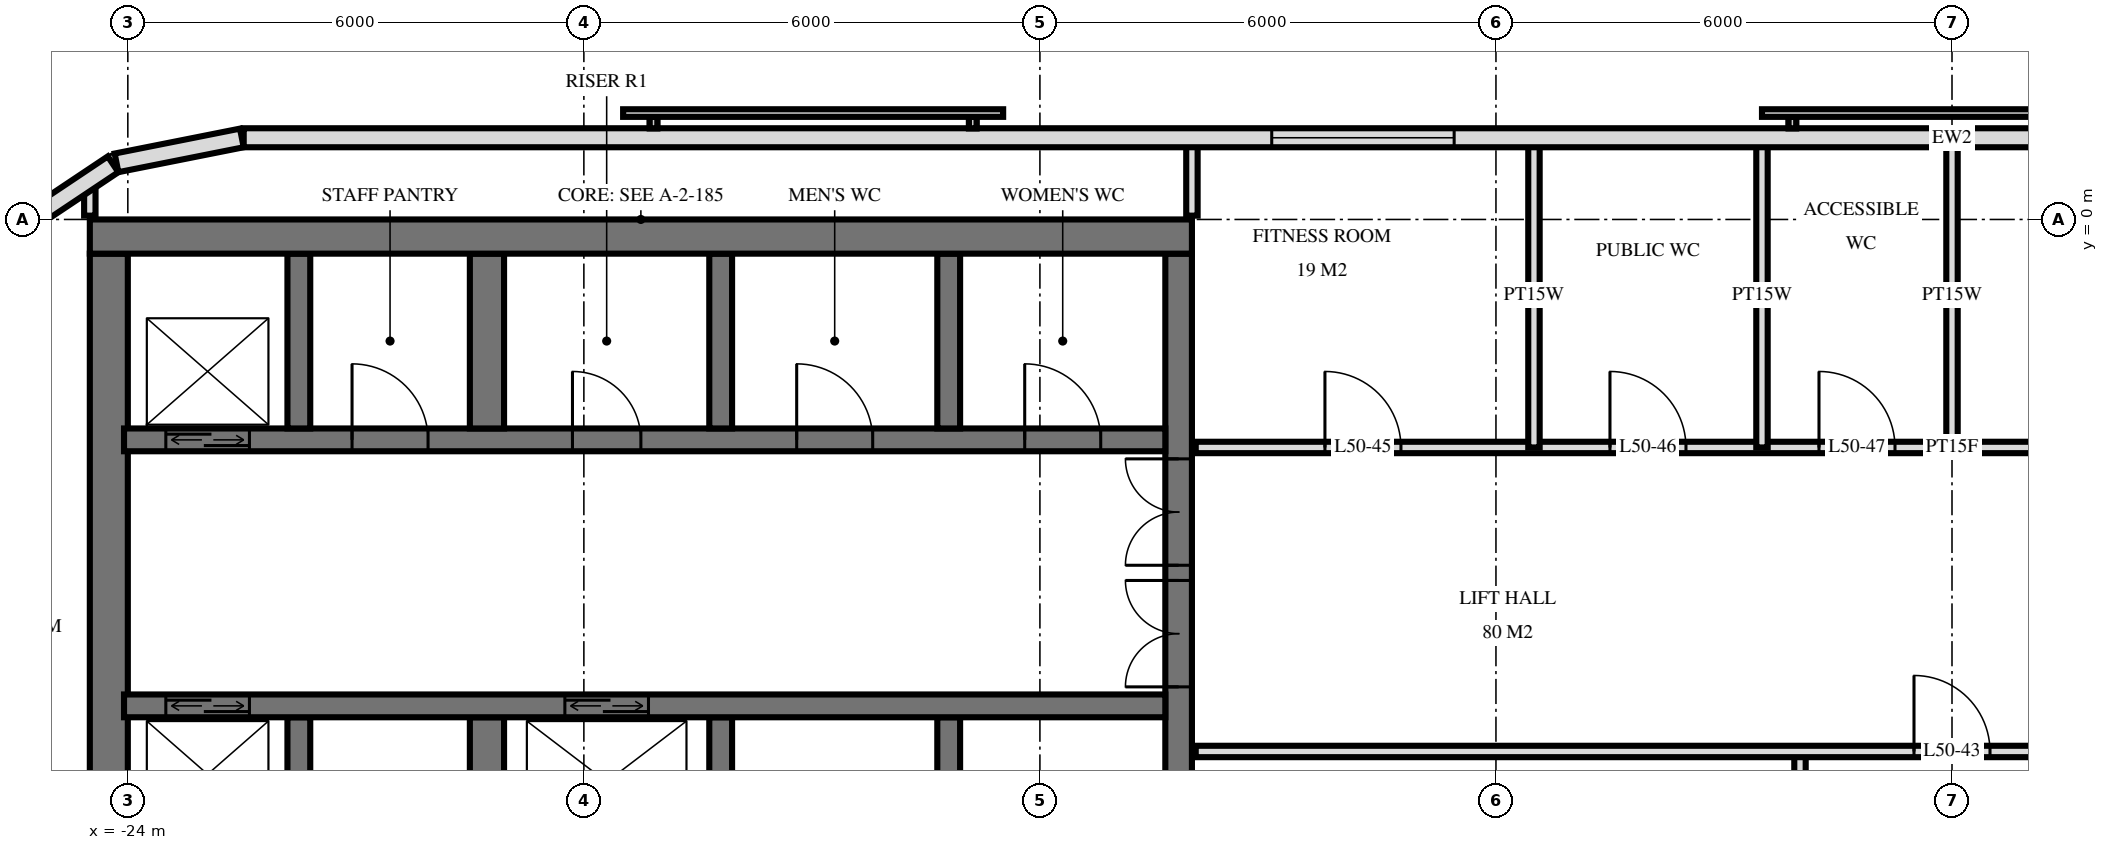
"""IFC4 building model, lengths in metres.
Left out: names, types, materials, properties, quantities, classifications, styles, units other than length and angle.
Written with IfcOpenShell. Run it as: python <this file> out.ifc"""

import sys

from ifc_helpers import new_model, si_unit, direction, frame, frame_2d, origin, place, context, subcontext, project, spatial, rectangle, extrude, element, fill, save


model = new_model("IFC4")
c1 = context("Model", 3, precision=1e-05, world=origin(), true_north=direction((0.0, 1.0)))
c2 = subcontext(c1, "Body", "Model", "MODEL_VIEW")
j1 = project(units=[si_unit("LENGTHUNIT", "METRE"), si_unit("PLANEANGLEUNIT", "RADIAN")], contexts=[c1])
p1 = place(None, origin())
s1 = spatial("IfcSite", under=j1, at=p1, CompositionType="ELEMENT")
p2 = place(p1, origin())
s2 = spatial("IfcBuilding", under=s1, at=p2, CompositionType="ELEMENT")
p3 = place(p2, frame((0.0, 0.0, 194.1)))
s3 = spatial("IfcBuildingStorey", under=s2, at=p3, CompositionType="ELEMENT", Elevation=194.1)
p4 = place(p3, frame((-24.5, -0.225, 0.0), z_axis=(0.0, 0.0, 1.0), x_axis=(1.0, 0.0, 0.0)))
e1 = element("IfcWall", 1, at=p4, inside=s3, PredefinedType="SHEAR", context=c2, shape_type="SweptSolid", body=[
    extrude(rectangle(XDim=14.5, YDim=0.45, at=frame_2d((7.25, 0.0))), origin(), (0.0, 0.0, 1.0), 3.5),
])
p5 = place(p3, frame((-10.175, -14.55, 0.0), z_axis=(0.0, 0.0, 1.0), x_axis=(0.0, 1.0, 0.0)))
e2 = element("IfcWall", 2, at=p5, inside=s3, PredefinedType="SHEAR", context=c2, shape_type="SweptSolid", body=[
    extrude(rectangle(XDim=14.1, YDim=0.35, at=frame_2d((7.05, 0.0))), origin(), (0.0, 0.0, 1.0), 3.5),
])
p6 = place(p5, frame((8.4, 0.0, 0.0)))
e3 = element("IfcOpeningElement", 3, at=p6, cuts=e2, PredefinedType="OPENING", context=c2, shape_type="SweptSolid", body=[
    extrude(rectangle(XDim=1.4, YDim=2.4, at=frame_2d((0.7, 1.2))), frame((0.0, 0.185, 0.0), z_axis=(0.0, -1.0, 0.0), x_axis=(1.0, 0.0, 0.0)), (0.0, 0.0, 1.0), 0.37),
])
p7 = place(p5, frame((10.0, 0.0, 0.0)))
e4 = element("IfcOpeningElement", 4, at=p7, cuts=e2, PredefinedType="OPENING", context=c2, shape_type="SweptSolid", body=[
    extrude(rectangle(XDim=1.4, YDim=2.4, at=frame_2d((0.7, 1.2))), frame((0.0, 0.185, 0.0), z_axis=(0.0, -1.0, 0.0), x_axis=(1.0, 0.0, 0.0)), (0.0, 0.0, 1.0), 0.37),
])
p8 = place(p5, frame((4.0, 0.0, 0.0)))
e5 = element("IfcOpeningElement", 5, at=p8, cuts=e2, PredefinedType="OPENING", context=c2, shape_type="SweptSolid", body=[
    extrude(rectangle(XDim=1.2, YDim=2.1, at=frame_2d((0.6, 1.05))), frame((0.0, 0.185, 0.0), z_axis=(0.0, -1.0, 0.0), x_axis=(1.0, 0.0, 0.0)), (0.0, 0.0, 1.0), 0.37),
])
p9 = place(p3, frame((-24.25, -14.55, 0.0), z_axis=(0.0, 0.0, 1.0), x_axis=(0.0, 1.0, 0.0)))
e6 = element("IfcWall", 6, at=p9, inside=s3, PredefinedType="SHEAR", context=c2, shape_type="SweptSolid", body=[
    extrude(rectangle(XDim=14.1, YDim=0.5, at=frame_2d((7.05, 0.0))), origin(), (0.0, 0.0, 1.0), 3.5),
])
p10 = place(p3, frame((-24.05, -2.9, 0.0), z_axis=(0.0, 0.0, 1.0), x_axis=(1.0, 0.0, 0.0)))
e7 = element("IfcWall", 7, at=p10, inside=s3, PredefinedType="SHEAR", context=c2, shape_type="SweptSolid", body=[
    extrude(rectangle(XDim=13.7, YDim=0.3, at=frame_2d((6.85, 0.0))), origin(), (0.0, 0.0, 1.0), 3.5),
])
p11 = place(p10, frame((0.55, 0.0, 0.0)))
e8 = element("IfcOpeningElement", 8, at=p11, cuts=e7, PredefinedType="OPENING", context=c2, shape_type="SweptSolid", body=[
    extrude(rectangle(XDim=1.1, YDim=2.1, at=frame_2d((0.55, 1.05))), frame((0.0, 0.16, 0.0), z_axis=(0.0, -1.0, 0.0), x_axis=(1.0, 0.0, 0.0)), (0.0, 0.0, 1.0), 0.32),
])
p12 = place(p10, frame((5.9, 0.0, 0.0)))
e9 = element("IfcOpeningElement", 9, at=p12, cuts=e7, PredefinedType="OPENING", context=c2, shape_type="SweptSolid", body=[
    extrude(rectangle(XDim=0.9, YDim=2.1, at=frame_2d((0.45, 1.05))), frame((0.0, 0.16, 0.0), z_axis=(0.0, -1.0, 0.0), x_axis=(1.0, 0.0, 0.0)), (0.0, 0.0, 1.0), 0.32),
])
p13 = place(p10, frame((11.85, 0.0, 0.0)))
e10 = element("IfcOpeningElement", 10, at=p13, cuts=e7, PredefinedType="OPENING", context=c2, shape_type="SweptSolid", body=[
    extrude(rectangle(XDim=1.0, YDim=2.1, at=frame_2d((0.5, 1.05))), frame((0.0, 0.16, 0.0), z_axis=(0.0, -1.0, 0.0), x_axis=(1.0, 0.0, 0.0)), (0.0, 0.0, 1.0), 0.32),
])
p14 = place(p10, frame((8.85, 0.0, 0.0)))
e11 = element("IfcOpeningElement", 11, at=p14, cuts=e7, PredefinedType="OPENING", context=c2, shape_type="SweptSolid", body=[
    extrude(rectangle(XDim=1.0, YDim=2.1, at=frame_2d((0.5, 1.05))), frame((0.0, 0.16, 0.0), z_axis=(0.0, -1.0, 0.0), x_axis=(1.0, 0.0, 0.0)), (0.0, 0.0, 1.0), 0.32),
])
p15 = place(p10, frame((3.0, 0.0, 0.0)))
e12 = element("IfcOpeningElement", 12, at=p15, cuts=e7, PredefinedType="OPENING", context=c2, shape_type="SweptSolid", body=[
    extrude(rectangle(XDim=1.0, YDim=2.1, at=frame_2d((0.5, 1.05))), frame((0.0, 0.16, 0.0), z_axis=(0.0, -1.0, 0.0), x_axis=(1.0, 0.0, 0.0)), (0.0, 0.0, 1.0), 0.32),
])
p16 = place(p3, frame((-24.05, -6.4, 0.0), z_axis=(0.0, 0.0, 1.0), x_axis=(1.0, 0.0, 0.0)))
e13 = element("IfcWall", 13, at=p16, inside=s3, PredefinedType="SHEAR", context=c2, shape_type="SweptSolid", body=[
    extrude(rectangle(XDim=13.7, YDim=0.3, at=frame_2d((6.85, 0.0))), origin(), (0.0, 0.0, 1.0), 3.5),
])
p17 = place(p16, frame((0.55, 0.0, 0.0)))
e14 = element("IfcOpeningElement", 14, at=p17, cuts=e13, PredefinedType="OPENING", context=c2, shape_type="SweptSolid", body=[
    extrude(rectangle(XDim=1.1, YDim=2.1, at=frame_2d((0.55, 1.05))), frame((0.0, 0.16, 0.0), z_axis=(0.0, -1.0, 0.0), x_axis=(1.0, 0.0, 0.0)), (0.0, 0.0, 1.0), 0.32),
])
p18 = place(p16, frame((5.8, 0.0, 0.0)))
e15 = element("IfcOpeningElement", 15, at=p18, cuts=e13, PredefinedType="OPENING", context=c2, shape_type="SweptSolid", body=[
    extrude(rectangle(XDim=1.1, YDim=2.1, at=frame_2d((0.55, 1.05))), frame((0.0, 0.16, 0.0), z_axis=(0.0, -1.0, 0.0), x_axis=(1.0, 0.0, 0.0)), (0.0, 0.0, 1.0), 0.32),
])
for number, where, z_axis, x_axis in (
    (16, (-13.2, -2.75, 0.0), (0.0, 0.0, 1.0), (0.0, 1.0, 0.0)),
    (17, (-13.2, -8.85, 0.0), (0.0, 0.0, 1.0), (0.0, 1.0, 0.0)),
    (18, (-16.2, -2.75, 0.0), (0.0, 0.0, 1.0), (0.0, 1.0, 0.0)),
    (19, (-16.2, -8.85, 0.0), (0.0, 0.0, 1.0), (0.0, 1.0, 0.0)),
):
    element("IfcWall", number, at=place(p3, frame(where, z_axis=z_axis, x_axis=x_axis)), inside=s3, PredefinedType="SHEAR", context=c2, shape_type="SweptSolid", body=[
        extrude(rectangle(XDim=2.3, YDim=0.3, at=frame_2d((1.15, 0.0))), origin(), (0.0, 0.0, 1.0), 3.5),
    ])
for number, where, z_axis, x_axis in (
    (20, (-19.275, -2.75, 0.0), (0.0, 0.0, 1.0), (0.0, 1.0, 0.0)),
    (21, (-19.275, -8.85, 0.0), (0.0, 0.0, 1.0), (0.0, 1.0, 0.0)),
):
    element("IfcWall", number, at=place(p3, frame(where, z_axis=z_axis, x_axis=x_axis)), inside=s3, PredefinedType="SHEAR", context=c2, shape_type="SweptSolid", body=[
        extrude(rectangle(XDim=2.3, YDim=0.45, at=frame_2d((1.15, 0.0))), origin(), (0.0, 0.0, 1.0), 3.5),
    ])
for number, where, z_axis, x_axis in (
    (22, (-21.75, -2.75, 0.0), (0.0, 0.0, 1.0), (0.0, 1.0, 0.0)),
    (23, (-21.75, -8.85, 0.0), (0.0, 0.0, 1.0), (0.0, 1.0, 0.0)),
):
    element("IfcWall", number, at=place(p3, frame(where, z_axis=z_axis, x_axis=x_axis)), inside=s3, PredefinedType="SHEAR", context=c2, shape_type="SweptSolid", body=[
        extrude(rectangle(XDim=2.3, YDim=0.3, at=frame_2d((1.15, 0.0))), origin(), (0.0, 0.0, 1.0), 3.5),
    ])
p19 = place(p3, frame((22.475, 1.075, 0.0), z_axis=(0.0, 0.0, 1.0), x_axis=(-1.0, 0.0, 0.0)))
e24 = element("IfcWall", 24, at=p19, inside=s3, PredefinedType="SOLIDWALL", context=c2, shape_type="SweptSolid", body=[
    extrude(rectangle(XDim=44.951, YDim=0.25, at=frame_2d((22.475, 0.0))), origin(), (0.0, 0.0, 1.0), 3.22),
])
p20 = place(p19, frame((13.775, 0.0, 0.9)))
e25 = element("IfcOpeningElement", 25, at=p20, cuts=e24, PredefinedType="OPENING", context=c2, shape_type="SweptSolid", body=[
    extrude(rectangle(XDim=2.4, YDim=1.5, at=frame_2d((1.2, 0.75))), frame((0.0, 0.135, 0.0), z_axis=(0.0, -1.0, 0.0), x_axis=(1.0, 0.0, 0.0)), (0.0, 0.0, 1.0), 0.27),
])
p21 = place(p19, frame((18.275, 0.0, 0.9)))
e26 = element("IfcOpeningElement", 26, at=p21, cuts=e24, PredefinedType="OPENING", context=c2, shape_type="SweptSolid", body=[
    extrude(rectangle(XDim=2.4, YDim=1.5, at=frame_2d((1.2, 0.75))), frame((0.0, 0.135, 0.0), z_axis=(0.0, -1.0, 0.0), x_axis=(1.0, 0.0, 0.0)), (0.0, 0.0, 1.0), 0.27),
])
p22 = place(p19, frame((29.025, 0.0, 0.9)))
e27 = element("IfcOpeningElement", 27, at=p22, cuts=e24, PredefinedType="OPENING", context=c2, shape_type="SweptSolid", body=[
    extrude(rectangle(XDim=2.4, YDim=1.5, at=frame_2d((1.2, 0.75))), frame((0.0, 0.135, 0.0), z_axis=(0.0, -1.0, 0.0), x_axis=(1.0, 0.0, 0.0)), (0.0, 0.0, 1.0), 0.27),
])
p23 = place(p3, frame((-22.5, 1.073, 0.0), z_axis=(0.0, 0.0, 1.0), x_axis=(-0.980803419081, -0.194999110559, 0.0)))
e28 = element("IfcWall", 28, at=p23, inside=s3, PredefinedType="SOLIDWALL", context=c2, shape_type="SweptSolid", body=[
    extrude(rectangle(XDim=1.681, YDim=0.25, at=frame_2d((0.841, 0.0))), origin(), (0.0, 0.0, 1.0), 3.22),
])
p24 = place(p3, frame((-24.194, 0.726, 0.0), z_axis=(0.0, 0.0, 1.0), x_axis=(-0.831482937015, -0.55555029066, 0.0)))
e29 = element("IfcWall", 29, at=p24, inside=s3, PredefinedType="SOLIDWALL", context=c2, shape_type="SweptSolid", body=[
    extrude(rectangle(XDim=1.656, YDim=0.25, at=frame_2d((0.828, 0.0))), origin(), (0.0, 0.0, 1.0), 3.22),
])
p25 = place(p3, frame((0.0, -3.0, 0.0), z_axis=(0.0, 0.0, 1.0), x_axis=(0.0, 1.0, 0.0)))
e30 = element("IfcWall", 30, at=p25, inside=s3, PredefinedType="PLUMBINGWALL", context=c2, shape_type="SweptSolid", body=[
    extrude(rectangle(XDim=4.02, YDim=0.15, at=frame_2d((2.01, 0.0))), origin(), (0.0, 0.0, 1.0), 3.22),
])
p26 = place(p3, frame((-2.0, -11.0, 0.0), z_axis=(0.0, 0.0, 1.0), x_axis=(0.0, 1.0, 0.0)))
e31 = element("IfcWall", 31, at=p26, inside=s3, PredefinedType="PARTITIONING", context=c2, shape_type="SweptSolid", body=[
    extrude(rectangle(XDim=4.0, YDim=0.15, at=frame_2d((2.0, 0.0))), origin(), (0.0, 0.0, 1.0), 3.22),
])
for number, where, z_axis, x_axis in (
    (32, (-2.5, -3.0, 0.0), (0.0, 0.0, 1.0), (0.0, 1.0, 0.0)),
    (33, (-5.5, -3.0, 0.0), (0.0, 0.0, 1.0), (0.0, 1.0, 0.0)),
):
    element("IfcWall", number, at=place(p3, frame(where, z_axis=z_axis, x_axis=x_axis)), inside=s3, PredefinedType="PLUMBINGWALL", context=c2, shape_type="SweptSolid", body=[
        extrude(rectangle(XDim=4.02, YDim=0.15, at=frame_2d((2.01, 0.0))), origin(), (0.0, 0.0, 1.0), 3.22),
    ])
p27 = place(p3, frame((-10.0, 0.05, 0.0), z_axis=(0.0, 0.0, 1.0), x_axis=(0.0, 1.0, 0.0)))
e34 = element("IfcWall", 34, at=p27, inside=s3, PredefinedType="PARTITIONING", context=c2, shape_type="SweptSolid", body=[
    extrude(rectangle(XDim=0.97, YDim=0.15, at=frame_2d((0.485, 0.0))), origin(), (0.0, 0.0, 1.0), 3.22),
])
p28 = place(p3, frame((-24.5, 0.05, 0.0), z_axis=(0.0, 0.0, 1.0), x_axis=(0.0, 1.0, 0.0)))
e35 = element("IfcWall", 35, at=p28, inside=s3, PredefinedType="PARTITIONING", context=c2, shape_type="SweptSolid", body=[
    extrude(rectangle(XDim=0.405, YDim=0.15, at=frame_2d((0.203, 0.0))), origin(), (0.0, 0.0, 1.0), 3.22),
])
p29 = place(p3, frame((-9.95, -7.0, 0.0), z_axis=(0.0, 0.0, 1.0), x_axis=(1.0, 0.0, 0.0)))
e36 = element("IfcWall", 36, at=p29, inside=s3, PredefinedType="PARTITIONING", context=c2, shape_type="SweptSolid", body=[
    extrude(rectangle(XDim=19.9, YDim=0.15, at=frame_2d((9.95, 0.0))), origin(), (0.0, 0.0, 1.0), 3.22),
])
p30 = place(p29, frame((9.45, 0.0, 0.0)))
e37 = element("IfcOpeningElement", 37, at=p30, cuts=e36, PredefinedType="OPENING", context=c2, shape_type="SweptSolid", body=[
    extrude(rectangle(XDim=1.0, YDim=2.1, at=frame_2d((0.5, 1.05))), frame((0.0, 0.085, 0.0), z_axis=(0.0, -1.0, 0.0), x_axis=(1.0, 0.0, 0.0)), (0.0, 0.0, 1.0), 0.17),
])
p31 = place(p29, frame((15.45, 0.0, 0.0)))
e38 = element("IfcOpeningElement", 38, at=p31, cuts=e36, PredefinedType="OPENING", context=c2, shape_type="SweptSolid", body=[
    extrude(rectangle(XDim=1.0, YDim=2.1, at=frame_2d((0.5, 1.05))), frame((0.0, 0.085, 0.0), z_axis=(0.0, -1.0, 0.0), x_axis=(1.0, 0.0, 0.0)), (0.0, 0.0, 1.0), 0.17),
])
p32 = place(p3, frame((-9.95, -3.0, 0.0), z_axis=(0.0, 0.0, 1.0), x_axis=(1.0, 0.0, 0.0)))
e39 = element("IfcWall", 39, at=p32, inside=s3, PredefinedType="PARTITIONING", context=c2, shape_type="SweptSolid", body=[
    extrude(rectangle(XDim=19.9, YDim=0.15, at=frame_2d((9.95, 0.0))), origin(), (0.0, 0.0, 1.0), 3.22),
])
p33 = place(p32, frame((1.7, 0.0, 0.0)))
e40 = element("IfcOpeningElement", 40, at=p33, cuts=e39, PredefinedType="OPENING", context=c2, shape_type="SweptSolid", body=[
    extrude(rectangle(XDim=1.0, YDim=2.1, at=frame_2d((0.5, 1.05))), frame((0.0, 0.085, 0.0), z_axis=(0.0, -1.0, 0.0), x_axis=(1.0, 0.0, 0.0)), (0.0, 0.0, 1.0), 0.17),
])
p34 = place(p32, frame((5.45, 0.0, 0.0)))
e41 = element("IfcOpeningElement", 41, at=p34, cuts=e39, PredefinedType="OPENING", context=c2, shape_type="SweptSolid", body=[
    extrude(rectangle(XDim=1.0, YDim=2.1, at=frame_2d((0.5, 1.05))), frame((0.0, 0.085, 0.0), z_axis=(0.0, -1.0, 0.0), x_axis=(1.0, 0.0, 0.0)), (0.0, 0.0, 1.0), 0.17),
])
p35 = place(p32, frame((8.2, 0.0, 0.0)))
e42 = element("IfcOpeningElement", 42, at=p35, cuts=e39, PredefinedType="OPENING", context=c2, shape_type="SweptSolid", body=[
    extrude(rectangle(XDim=1.0, YDim=2.1, at=frame_2d((0.5, 1.05))), frame((0.0, 0.085, 0.0), z_axis=(0.0, -1.0, 0.0), x_axis=(1.0, 0.0, 0.0)), (0.0, 0.0, 1.0), 0.17),
])
p36 = place(p32, frame((11.95, 0.0, 0.0)))
e43 = element("IfcOpeningElement", 43, at=p36, cuts=e39, PredefinedType="OPENING", context=c2, shape_type="SweptSolid", body=[
    extrude(rectangle(XDim=1.0, YDim=2.1, at=frame_2d((0.5, 1.05))), frame((0.0, 0.085, 0.0), z_axis=(0.0, -1.0, 0.0), x_axis=(1.0, 0.0, 0.0)), (0.0, 0.0, 1.0), 0.17),
])
p37 = place(p32, frame((16.95, 0.0, 0.0)))
e44 = element("IfcOpeningElement", 44, at=p37, cuts=e39, PredefinedType="OPENING", context=c2, shape_type="SweptSolid", body=[
    extrude(rectangle(XDim=1.0, YDim=2.1, at=frame_2d((0.5, 1.05))), frame((0.0, 0.085, 0.0), z_axis=(0.0, -1.0, 0.0), x_axis=(1.0, 0.0, 0.0)), (0.0, 0.0, 1.0), 0.17),
])
p38 = place(p22, origin())
e45 = element("IfcWindow", 45, at=p38, inside=s3, PartitioningType="SINGLE_PANEL", PredefinedType="WINDOW", context=c2, shape_type="SweptSolid", body=[
    extrude(rectangle(XDim=2.4, YDim=1.5, at=frame_2d((1.2, 0.75))), frame((0.0, 0.03, 0.0), z_axis=(0.0, -1.0, 0.0), x_axis=(1.0, 0.0, 0.0)), (0.0, 0.0, 1.0), 0.06),
])
fill(e27, e45)
p39 = place(p11, origin())
e46 = element("IfcDoor", 46, at=p39, inside=s3, OperationType="DOUBLE_DOOR_SLIDING", PredefinedType="USERDEFINED", context=c2, shape_type="SweptSolid", body=[
    extrude(rectangle(XDim=1.1, YDim=2.1, at=frame_2d((0.55, 1.05))), frame((0.0, 0.025, 0.0), z_axis=(0.0, -1.0, 0.0), x_axis=(1.0, 0.0, 0.0)), (0.0, 0.0, 1.0), 0.05),
])
fill(e8, e46)
p40 = place(p17, origin())
e47 = element("IfcDoor", 47, at=p40, inside=s3, OperationType="DOUBLE_DOOR_SLIDING", PredefinedType="USERDEFINED", context=c2, shape_type="SweptSolid", body=[
    extrude(rectangle(XDim=1.1, YDim=2.1, at=frame_2d((0.55, 1.05))), frame((0.0, 0.025, 0.0), z_axis=(0.0, -1.0, 0.0), x_axis=(1.0, 0.0, 0.0)), (0.0, 0.0, 1.0), 0.05),
])
fill(e14, e47)
p41 = place(p18, origin())
e48 = element("IfcDoor", 48, at=p41, inside=s3, OperationType="DOUBLE_DOOR_SLIDING", PredefinedType="USERDEFINED", context=c2, shape_type="SweptSolid", body=[
    extrude(rectangle(XDim=1.1, YDim=2.1, at=frame_2d((0.55, 1.05))), frame((0.0, 0.025, 0.0), z_axis=(0.0, -1.0, 0.0), x_axis=(1.0, 0.0, 0.0)), (0.0, 0.0, 1.0), 0.05),
])
fill(e15, e48)
p42 = place(p6, origin())
e49 = element("IfcDoor", 49, at=p42, inside=s3, OperationType="DOUBLE_DOOR_SINGLE_SWING", PredefinedType="DOOR", context=c2, shape_type="SweptSolid", body=[
    extrude(rectangle(XDim=1.4, YDim=2.4, at=frame_2d((0.7, 1.2))), frame((0.0, 0.025, 0.0), z_axis=(0.0, -1.0, 0.0), x_axis=(1.0, 0.0, 0.0)), (0.0, 0.0, 1.0), 0.05),
])
fill(e3, e49)
p43 = place(p7, origin())
e50 = element("IfcDoor", 50, at=p43, inside=s3, OperationType="DOUBLE_DOOR_SINGLE_SWING", PredefinedType="DOOR", context=c2, shape_type="SweptSolid", body=[
    extrude(rectangle(XDim=1.4, YDim=2.4, at=frame_2d((0.7, 1.2))), frame((0.0, 0.025, 0.0), z_axis=(0.0, -1.0, 0.0), x_axis=(1.0, 0.0, 0.0)), (0.0, 0.0, 1.0), 0.05),
])
fill(e4, e50)
p44 = place(p12, origin())
e51 = element("IfcDoor", 51, at=p44, inside=s3, OperationType="SINGLE_SWING_RIGHT", PredefinedType="DOOR", context=c2, shape_type="SweptSolid", body=[
    extrude(rectangle(XDim=0.9, YDim=2.1, at=frame_2d((0.45, 1.05))), frame((0.0, 0.025, 0.0), z_axis=(0.0, -1.0, 0.0), x_axis=(1.0, 0.0, 0.0)), (0.0, 0.0, 1.0), 0.05),
])
fill(e9, e51)
p45 = place(p13, origin())
e52 = element("IfcDoor", 52, at=p45, inside=s3, OperationType="SINGLE_SWING_RIGHT", PredefinedType="DOOR", context=c2, shape_type="SweptSolid", body=[
    extrude(rectangle(XDim=1.0, YDim=2.1, at=frame_2d((0.5, 1.05))), frame((0.0, 0.025, 0.0), z_axis=(0.0, -1.0, 0.0), x_axis=(1.0, 0.0, 0.0)), (0.0, 0.0, 1.0), 0.05),
])
fill(e10, e52)
p46 = place(p14, origin())
e53 = element("IfcDoor", 53, at=p46, inside=s3, OperationType="SINGLE_SWING_RIGHT", PredefinedType="DOOR", context=c2, shape_type="SweptSolid", body=[
    extrude(rectangle(XDim=1.0, YDim=2.1, at=frame_2d((0.5, 1.05))), frame((0.0, 0.025, 0.0), z_axis=(0.0, -1.0, 0.0), x_axis=(1.0, 0.0, 0.0)), (0.0, 0.0, 1.0), 0.05),
])
fill(e11, e53)
p47 = place(p15, origin())
e54 = element("IfcDoor", 54, at=p47, inside=s3, OperationType="SINGLE_SWING_RIGHT", PredefinedType="DOOR", context=c2, shape_type="SweptSolid", body=[
    extrude(rectangle(XDim=1.0, YDim=2.1, at=frame_2d((0.5, 1.05))), frame((0.0, 0.025, 0.0), z_axis=(0.0, -1.0, 0.0), x_axis=(1.0, 0.0, 0.0)), (0.0, 0.0, 1.0), 0.05),
])
fill(e12, e54)
p48 = place(p30, origin())
e55 = element("IfcDoor", 55, at=p48, inside=s3, OperationType="SINGLE_SWING_RIGHT", PredefinedType="DOOR", context=c2, shape_type="SweptSolid", body=[
    extrude(rectangle(XDim=1.0, YDim=2.1, at=frame_2d((0.5, 1.05))), frame((0.0, 0.025, 0.0), z_axis=(0.0, -1.0, 0.0), x_axis=(1.0, 0.0, 0.0)), (0.0, 0.0, 1.0), 0.05),
])
fill(e37, e55)
p49 = place(p33, origin())
e56 = element("IfcDoor", 56, at=p49, inside=s3, OperationType="SINGLE_SWING_RIGHT", PredefinedType="DOOR", context=c2, shape_type="SweptSolid", body=[
    extrude(rectangle(XDim=1.0, YDim=2.1, at=frame_2d((0.5, 1.05))), frame((0.0, 0.025, 0.0), z_axis=(0.0, -1.0, 0.0), x_axis=(1.0, 0.0, 0.0)), (0.0, 0.0, 1.0), 0.05),
])
fill(e40, e56)
p50 = place(p34, origin())
e57 = element("IfcDoor", 57, at=p50, inside=s3, OperationType="SINGLE_SWING_RIGHT", PredefinedType="DOOR", context=c2, shape_type="SweptSolid", body=[
    extrude(rectangle(XDim=1.0, YDim=2.1, at=frame_2d((0.5, 1.05))), frame((0.0, 0.025, 0.0), z_axis=(0.0, -1.0, 0.0), x_axis=(1.0, 0.0, 0.0)), (0.0, 0.0, 1.0), 0.05),
])
fill(e41, e57)
p51 = place(p35, origin())
e58 = element("IfcDoor", 58, at=p51, inside=s3, OperationType="SINGLE_SWING_RIGHT", PredefinedType="DOOR", context=c2, shape_type="SweptSolid", body=[
    extrude(rectangle(XDim=1.0, YDim=2.1, at=frame_2d((0.5, 1.05))), frame((0.0, 0.025, 0.0), z_axis=(0.0, -1.0, 0.0), x_axis=(1.0, 0.0, 0.0)), (0.0, 0.0, 1.0), 0.05),
])
fill(e42, e58)
save(model, sys.argv[1])
